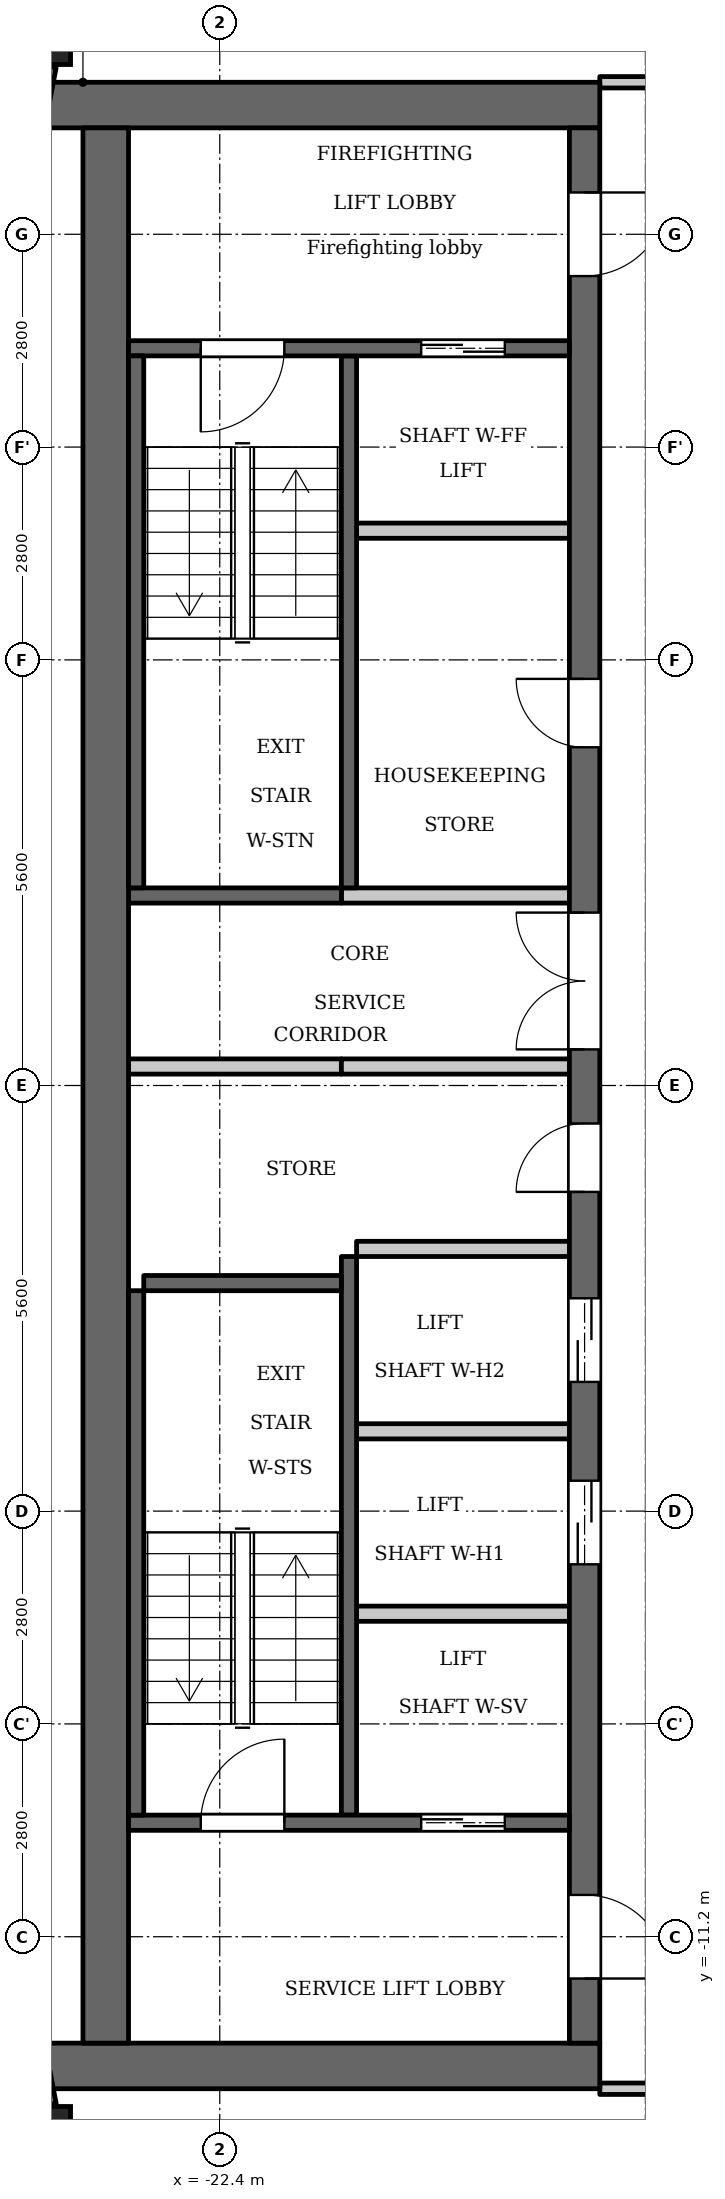
"""IFC4 building model, lengths in metres.
Left out: names, types, materials, properties, quantities, classifications, styles, units other than length and angle.
Written with IfcOpenShell. Run it as: python <this file> out.ifc"""

import sys

from ifc_helpers import new_model, si_unit, direction, frame, frame_2d, origin, origin_2d, place, context, subcontext, project, spatial, rectangle, extrude, element, fill, save


model = new_model("IFC4")
c1 = context("Model", 3, precision=1e-05, world=origin(), true_north=direction((0.0, 1.0)))
c2 = subcontext(c1, "Body", "Model", "MODEL_VIEW")
j1 = project(units=[si_unit("LENGTHUNIT", "METRE"), si_unit("PLANEANGLEUNIT", "RADIAN")], contexts=[c1])
p1 = place(None, origin())
s1 = spatial("IfcSite", under=j1, at=p1, CompositionType="ELEMENT")
p2 = place(p1, origin())
s2 = spatial("IfcBuilding", under=s1, at=p2, CompositionType="ELEMENT")
p3 = place(p2, frame((0.0, 0.0, 269.7)))
s3 = spatial("IfcBuildingStorey", under=s2, at=p3, CompositionType="ELEMENT", Elevation=269.7)
for number, where, z_axis, x_axis in (
    (1, (-24.738, 13.809, 0.0), (0.0, 0.0, 1.0), (1.0, 0.0, 0.0)),
    (2, (-24.738, -13.809, 0.0), (0.0, 0.0, 1.0), (1.0, 0.0, 0.0)),
):
    element("IfcColumn", number, at=place(p3, frame(where, z_axis=z_axis, x_axis=x_axis)), inside=s3, PredefinedType="COLUMN", context=c2, shape_type="SweptSolid", body=[
        extrude(rectangle(XDim=0.75, YDim=0.75, at=origin_2d()), origin(), (0.0, 0.0, 1.0), 3.5),
    ])
for number, where, z_axis, x_axis in (
    (3, (-24.7, 13.42, 0.0), (0.0, 0.0, 1.0), (-0.187, -0.982, 0.0)),
    (4, (-25.053, -11.572, 0.0), (0.0, 0.0, 1.0), (0.187, -0.982, 0.0)),
):
    element("IfcWall", number, at=place(p3, frame(where, z_axis=z_axis, x_axis=x_axis)), inside=s3, PredefinedType="SOLIDWALL", context=c2, shape_type="SweptSolid", body=[
        extrude(rectangle(XDim=1.881, YDim=0.3, at=frame_2d((0.941, 0.0))), origin(), (0.0, 0.0, 1.0), 2.55),
    ])
p4 = place(p3, frame((-20.7, 2.6, 0.0), z_axis=(0.0, 0.0, 1.0), x_axis=(0.0, 1.0, 0.0)))
e5 = element("IfcWall", 5, at=p4, inside=s3, PredefinedType="SHEAR", context=c2, shape_type="SweptSolid", body=[
    extrude(rectangle(XDim=7.0, YDim=0.2, at=frame_2d((3.5, 0.0))), origin(), (0.0, 0.0, 1.0), 3.2),
])
p5 = place(p3, frame((-20.7, -9.6, 0.0), z_axis=(0.0, 0.0, 1.0), x_axis=(0.0, 1.0, 0.0)))
e6 = element("IfcWall", 6, at=p5, inside=s3, PredefinedType="SHEAR", context=c2, shape_type="SweptSolid", body=[
    extrude(rectangle(XDim=7.35, YDim=0.2, at=frame_2d((3.675, 0.0))), origin(), (0.0, 0.0, 1.0), 3.2),
])
p6 = place(p3, frame((-20.8, 2.5, 0.0), z_axis=(0.0, 0.0, 1.0), x_axis=(-1.0, 0.0, 0.0)))
e7 = element("IfcWall", 7, at=p6, inside=s3, PredefinedType="SHEAR", context=c2, shape_type="SweptSolid", body=[
    extrude(rectangle(XDim=2.8, YDim=0.2, at=frame_2d((1.4, 0.0))), origin(), (0.0, 0.0, 1.0), 3.2),
])
p7 = place(p3, frame((-20.8, 0.25, 0.0), z_axis=(0.0, 0.0, 1.0), x_axis=(-1.0, 0.0, 0.0)))
e8 = element("IfcWall", 8, at=p7, inside=s3, PredefinedType="PARTITIONING", context=c2, shape_type="SweptSolid", body=[
    extrude(rectangle(XDim=2.8, YDim=0.2, at=frame_2d((1.4, 0.0))), origin(), (0.0, 0.0, 1.0), 3.2),
])
for number, where, z_axis, x_axis in (
    (9, (-17.4, 12.9, 0.0), (0.0, 0.0, 1.0), (-1.0, 0.0, 0.0)),
    (10, (-17.4, -12.9, 0.0), (0.0, 0.0, 1.0), (-1.0, 0.0, 0.0)),
):
    element("IfcWall", number, at=place(p3, frame(where, z_axis=z_axis, x_axis=x_axis)), inside=s3, PredefinedType="SHEAR", context=c2, shape_type="SweptSolid", body=[
        extrude(rectangle(XDim=7.32, YDim=0.6, at=frame_2d((3.66, 0.0))), origin(), (0.0, 0.0, 1.0), 3.2),
    ])
p8 = place(p3, frame((-17.6, -12.6, 0.0), z_axis=(0.0, 0.0, 1.0), x_axis=(0.0, 1.0, 0.0)))
e11 = element("IfcWall", 11, at=p8, inside=s3, PredefinedType="SHEAR", context=c2, shape_type="SweptSolid", body=[
    extrude(rectangle(XDim=25.2, YDim=0.4, at=frame_2d((12.6, 0.0))), origin(), (0.0, 0.0, 1.0), 3.2),
])
p9 = place(p8, frame((6.3, 0.0, 0.0)))
e12 = element("IfcOpeningElement", 12, at=p9, cuts=e11, PredefinedType="OPENING", context=c2, shape_type="SweptSolid", body=[
    extrude(rectangle(XDim=1.1, YDim=2.1, at=frame_2d((0.55, 1.05))), frame((0.0, 0.21, 0.0), z_axis=(0.0, -1.0, 0.0), x_axis=(1.0, 0.0, 0.0)), (0.0, 0.0, 1.0), 0.42),
])
p10 = place(p8, frame((8.7, 0.0, 0.0)))
e13 = element("IfcOpeningElement", 13, at=p10, cuts=e11, PredefinedType="OPENING", context=c2, shape_type="SweptSolid", body=[
    extrude(rectangle(XDim=1.1, YDim=2.1, at=frame_2d((0.55, 1.05))), frame((0.0, 0.21, 0.0), z_axis=(0.0, -1.0, 0.0), x_axis=(1.0, 0.0, 0.0)), (0.0, 0.0, 1.0), 0.42),
])
p11 = place(p8, frame((11.2, 0.0, 0.0)))
e14 = element("IfcOpeningElement", 14, at=p11, cuts=e11, PredefinedType="OPENING", context=c2, shape_type="SweptSolid", body=[
    extrude(rectangle(XDim=0.9, YDim=2.1, at=frame_2d((0.45, 1.05))), frame((0.0, 0.21, 0.0), z_axis=(0.0, -1.0, 0.0), x_axis=(1.0, 0.0, 0.0)), (0.0, 0.0, 1.0), 0.42),
])
p12 = place(p8, frame((17.05, 0.0, 0.0)))
e15 = element("IfcOpeningElement", 15, at=p12, cuts=e11, PredefinedType="OPENING", context=c2, shape_type="SweptSolid", body=[
    extrude(rectangle(XDim=0.9, YDim=2.1, at=frame_2d((0.45, 1.05))), frame((0.0, 0.21, 0.0), z_axis=(0.0, -1.0, 0.0), x_axis=(1.0, 0.0, 0.0)), (0.0, 0.0, 1.0), 0.42),
])
p13 = place(p8, frame((23.25, 0.0, 0.0)))
e16 = element("IfcOpeningElement", 16, at=p13, cuts=e11, PredefinedType="OPENING", context=c2, shape_type="SweptSolid", body=[
    extrude(rectangle(XDim=1.1, YDim=2.1, at=frame_2d((0.55, 1.05))), frame((0.0, 0.21, 0.0), z_axis=(0.0, -1.0, 0.0), x_axis=(1.0, 0.0, 0.0)), (0.0, 0.0, 1.0), 0.42),
])
p14 = place(p8, frame((0.85, 0.0, 0.0)))
e17 = element("IfcOpeningElement", 17, at=p14, cuts=e11, PredefinedType="OPENING", context=c2, shape_type="SweptSolid", body=[
    extrude(rectangle(XDim=1.1, YDim=2.1, at=frame_2d((0.55, 1.05))), frame((0.0, 0.21, 0.0), z_axis=(0.0, -1.0, 0.0), x_axis=(1.0, 0.0, 0.0)), (0.0, 0.0, 1.0), 0.42),
])
p15 = place(p8, frame((13.075, 0.0, 0.0)))
e18 = element("IfcOpeningElement", 18, at=p15, cuts=e11, PredefinedType="OPENING", context=c2, shape_type="SweptSolid", body=[
    extrude(rectangle(XDim=1.8, YDim=2.1, at=frame_2d((0.9, 1.05))), frame((0.0, 0.21, 0.0), z_axis=(0.0, -1.0, 0.0), x_axis=(1.0, 0.0, 0.0)), (0.0, 0.0, 1.0), 0.42),
])
p16 = place(p3, frame((-23.9, -12.6, 0.0), z_axis=(0.0, 0.0, 1.0), x_axis=(0.0, 1.0, 0.0)))
e19 = element("IfcWall", 19, at=p16, inside=s3, PredefinedType="SHEAR", context=c2, shape_type="SweptSolid", body=[
    extrude(rectangle(XDim=25.2, YDim=0.6, at=frame_2d((12.6, 0.0))), origin(), (0.0, 0.0, 1.0), 3.2),
])
p17 = place(p3, frame((-17.8, -9.7, 0.0), z_axis=(0.0, 0.0, 1.0), x_axis=(-1.0, 0.0, 0.0)))
e20 = element("IfcWall", 20, at=p17, inside=s3, PredefinedType="SHEAR", context=c2, shape_type="SweptSolid", body=[
    extrude(rectangle(XDim=5.8, YDim=0.2, at=frame_2d((2.9, 0.0))), origin(), (0.0, 0.0, 1.0), 3.2),
])
p18 = place(p17, frame((0.85, 0.0, 0.0)))
e21 = element("IfcOpeningElement", 21, at=p18, cuts=e20, PredefinedType="OPENING", context=c2, shape_type="SweptSolid", body=[
    extrude(rectangle(XDim=1.1, YDim=2.1, at=frame_2d((0.55, 1.05))), frame((0.0, 0.11, 0.0), z_axis=(0.0, -1.0, 0.0), x_axis=(1.0, 0.0, 0.0)), (0.0, 0.0, 1.0), 0.22),
])
p19 = place(p17, frame((3.75, 0.0, 0.0)))
e22 = element("IfcOpeningElement", 22, at=p19, cuts=e20, PredefinedType="OPENING", context=c2, shape_type="SweptSolid", body=[
    extrude(rectangle(XDim=1.1, YDim=2.1, at=frame_2d((0.55, 1.05))), frame((0.0, 0.11, 0.0), z_axis=(0.0, -1.0, 0.0), x_axis=(1.0, 0.0, 0.0)), (0.0, 0.0, 1.0), 0.22),
])
for number, where, z_axis, x_axis in (
    (23, (-17.8, -6.95, 0.0), (0.0, 0.0, 1.0), (-1.0, 0.0, 0.0)),
    (24, (-17.8, -4.55, 0.0), (0.0, 0.0, 1.0), (-1.0, 0.0, 0.0)),
    (25, (-17.8, -2.15, 0.0), (0.0, 0.0, 1.0), (-1.0, 0.0, 0.0)),
):
    element("IfcWall", number, at=place(p3, frame(where, z_axis=z_axis, x_axis=x_axis)), inside=s3, PredefinedType="PARTITIONING", context=c2, shape_type="SweptSolid", body=[
        extrude(rectangle(XDim=2.8, YDim=0.2, at=frame_2d((1.4, 0.0))), origin(), (0.0, 0.0, 1.0), 3.2),
    ])
for number, where, z_axis, x_axis in (
    (26, (-17.8, 0.25, 0.0), (0.0, 0.0, 1.0), (-1.0, 0.0, 0.0)),
    (27, (-17.8, 2.5, 0.0), (0.0, 0.0, 1.0), (-1.0, 0.0, 0.0)),
):
    element("IfcWall", number, at=place(p3, frame(where, z_axis=z_axis, x_axis=x_axis)), inside=s3, PredefinedType="PARTITIONING", context=c2, shape_type="SweptSolid", body=[
        extrude(rectangle(XDim=3.0, YDim=0.2, at=frame_2d((1.5, 0.0))), origin(), (0.0, 0.0, 1.0), 3.2),
    ])
p20 = place(p3, frame((-17.8, 7.3, 0.0), z_axis=(0.0, 0.0, 1.0), x_axis=(-1.0, 0.0, 0.0)))
e28 = element("IfcWall", 28, at=p20, inside=s3, PredefinedType="PARTITIONING", context=c2, shape_type="SweptSolid", body=[
    extrude(rectangle(XDim=2.8, YDim=0.2, at=frame_2d((1.4, 0.0))), origin(), (0.0, 0.0, 1.0), 3.2),
])
p21 = place(p3, frame((-17.8, 9.7, 0.0), z_axis=(0.0, 0.0, 1.0), x_axis=(-1.0, 0.0, 0.0)))
e29 = element("IfcWall", 29, at=p21, inside=s3, PredefinedType="SHEAR", context=c2, shape_type="SweptSolid", body=[
    extrude(rectangle(XDim=5.8, YDim=0.2, at=frame_2d((2.9, 0.0))), origin(), (0.0, 0.0, 1.0), 3.2),
])
p22 = place(p21, frame((0.85, 0.0, 0.0)))
e30 = element("IfcOpeningElement", 30, at=p22, cuts=e29, PredefinedType="OPENING", context=c2, shape_type="SweptSolid", body=[
    extrude(rectangle(XDim=1.1, YDim=2.1, at=frame_2d((0.55, 1.05))), frame((0.0, 0.11, 0.0), z_axis=(0.0, -1.0, 0.0), x_axis=(1.0, 0.0, 0.0)), (0.0, 0.0, 1.0), 0.22),
])
p23 = place(p21, frame((3.75, 0.0, 0.0)))
e31 = element("IfcOpeningElement", 31, at=p23, cuts=e29, PredefinedType="OPENING", context=c2, shape_type="SweptSolid", body=[
    extrude(rectangle(XDim=1.1, YDim=2.1, at=frame_2d((0.55, 1.05))), frame((0.0, 0.11, 0.0), z_axis=(0.0, -1.0, 0.0), x_axis=(1.0, 0.0, 0.0)), (0.0, 0.0, 1.0), 0.22),
])
p24 = place(p3, frame((-23.5, 2.6, 0.0), z_axis=(0.0, 0.0, 1.0), x_axis=(0.0, 1.0, 0.0)))
e32 = element("IfcWall", 32, at=p24, inside=s3, PredefinedType="SHEAR", context=c2, shape_type="SweptSolid", body=[
    extrude(rectangle(XDim=7.0, YDim=0.2, at=frame_2d((3.5, 0.0))), origin(), (0.0, 0.0, 1.0), 3.2),
])
p25 = place(p3, frame((-23.5, -9.6, 0.0), z_axis=(0.0, 0.0, 1.0), x_axis=(0.0, 1.0, 0.0)))
e33 = element("IfcWall", 33, at=p25, inside=s3, PredefinedType="SHEAR", context=c2, shape_type="SweptSolid", body=[
    extrude(rectangle(XDim=6.9, YDim=0.2, at=frame_2d((3.45, 0.0))), origin(), (0.0, 0.0, 1.0), 3.2),
])
p26 = place(p3, frame((-20.8, -2.6, 0.0), z_axis=(0.0, 0.0, 1.0), x_axis=(-1.0, 0.0, 0.0)))
e34 = element("IfcWall", 34, at=p26, inside=s3, PredefinedType="SHEAR", context=c2, shape_type="SweptSolid", body=[
    extrude(rectangle(XDim=2.6, YDim=0.2, at=frame_2d((1.3, 0.0))), origin(), (0.0, 0.0, 1.0), 3.2),
])
p27 = place(p3, frame((-17.4, -13.2, 0.0), z_axis=(0.0, 0.0, 1.0), x_axis=(1.0, 0.0, 0.0)))
e35 = element("IfcWall", 35, at=p27, inside=s3, PredefinedType="PARTITIONING", context=c2, shape_type="SweptSolid", body=[
    extrude(rectangle(XDim=2.325, YDim=0.15, at=frame_2d((1.163, 0.0))), origin(), (0.0, 0.0, 1.0), 3.2),
])
p28 = place(p27, frame((0.65, 0.0, 0.0)))
e36 = element("IfcOpeningElement", 36, at=p28, cuts=e35, PredefinedType="OPENING", context=c2, shape_type="SweptSolid", body=[
    extrude(rectangle(XDim=1.0, YDim=2.1, at=frame_2d((0.5, 1.05))), frame((0.0, 0.085, 0.0), z_axis=(0.0, -1.0, 0.0), x_axis=(1.0, 0.0, 0.0)), (0.0, 0.0, 1.0), 0.17),
])
p29 = place(p3, frame((-17.4, 13.2, 0.0), z_axis=(0.0, 0.0, 1.0), x_axis=(1.0, 0.0, 0.0)))
e37 = element("IfcWall", 37, at=p29, inside=s3, PredefinedType="PARTITIONING", context=c2, shape_type="SweptSolid", body=[
    extrude(rectangle(XDim=2.325, YDim=0.15, at=frame_2d((1.163, 0.0))), origin(), (0.0, 0.0, 1.0), 3.2),
])
p30 = place(p29, frame((0.75, 0.0, 0.0)))
e38 = element("IfcOpeningElement", 38, at=p30, cuts=e37, PredefinedType="OPENING", context=c2, shape_type="SweptSolid", body=[
    extrude(rectangle(XDim=1.0, YDim=2.1, at=frame_2d((0.5, 1.05))), frame((0.0, 0.085, 0.0), z_axis=(0.0, -1.0, 0.0), x_axis=(1.0, 0.0, 0.0)), (0.0, 0.0, 1.0), 0.17),
])
p31 = place(p18, origin())
e39 = element("IfcDoor", 39, at=p31, inside=s3, OperationType="DOUBLE_DOOR_SLIDING", PredefinedType="DOOR", context=c2, shape_type="SweptSolid", body=[
    extrude(rectangle(XDim=1.1, YDim=2.1, at=frame_2d((0.55, 1.05))), frame((0.0, 0.025, 0.0), z_axis=(0.0, -1.0, 0.0), x_axis=(1.0, 0.0, 0.0)), (0.0, 0.0, 1.0), 0.05),
])
fill(e21, e39)
p32 = place(p9, origin())
e40 = element("IfcDoor", 40, at=p32, inside=s3, OperationType="DOUBLE_DOOR_SLIDING", PredefinedType="DOOR", context=c2, shape_type="SweptSolid", body=[
    extrude(rectangle(XDim=1.1, YDim=2.1, at=frame_2d((0.55, 1.05))), frame((0.0, 0.025, 0.0), z_axis=(0.0, -1.0, 0.0), x_axis=(1.0, 0.0, 0.0)), (0.0, 0.0, 1.0), 0.05),
])
fill(e12, e40)
p33 = place(p10, origin())
e41 = element("IfcDoor", 41, at=p33, inside=s3, OperationType="DOUBLE_DOOR_SLIDING", PredefinedType="DOOR", context=c2, shape_type="SweptSolid", body=[
    extrude(rectangle(XDim=1.1, YDim=2.1, at=frame_2d((0.55, 1.05))), frame((0.0, 0.025, 0.0), z_axis=(0.0, -1.0, 0.0), x_axis=(1.0, 0.0, 0.0)), (0.0, 0.0, 1.0), 0.05),
])
fill(e13, e41)
p34 = place(p11, origin())
e42 = element("IfcDoor", 42, at=p34, inside=s3, OperationType="SINGLE_SWING_RIGHT", PredefinedType="DOOR", context=c2, shape_type="SweptSolid", body=[
    extrude(rectangle(XDim=0.9, YDim=2.1, at=frame_2d((0.45, 1.05))), frame((0.0, 0.025, 0.0), z_axis=(0.0, -1.0, 0.0), x_axis=(1.0, 0.0, 0.0)), (0.0, 0.0, 1.0), 0.05),
])
fill(e14, e42)
p35 = place(p12, origin())
e43 = element("IfcDoor", 43, at=p35, inside=s3, OperationType="SINGLE_SWING_LEFT", PredefinedType="DOOR", context=c2, shape_type="SweptSolid", body=[
    extrude(rectangle(XDim=0.9, YDim=2.1, at=frame_2d((0.45, 1.05))), frame((0.0, 0.025, 0.0), z_axis=(0.0, -1.0, 0.0), x_axis=(1.0, 0.0, 0.0)), (0.0, 0.0, 1.0), 0.05),
])
fill(e15, e43)
p36 = place(p22, origin())
e44 = element("IfcDoor", 44, at=p36, inside=s3, OperationType="DOUBLE_DOOR_SLIDING", PredefinedType="DOOR", context=c2, shape_type="SweptSolid", body=[
    extrude(rectangle(XDim=1.1, YDim=2.1, at=frame_2d((0.55, 1.05))), frame((0.0, 0.025, 0.0), z_axis=(0.0, -1.0, 0.0), x_axis=(1.0, 0.0, 0.0)), (0.0, 0.0, 1.0), 0.05),
])
fill(e30, e44)
p37 = place(p13, origin())
e45 = element("IfcDoor", 45, at=p37, inside=s3, OperationType="SINGLE_SWING_RIGHT", PredefinedType="DOOR", context=c2, shape_type="SweptSolid", body=[
    extrude(rectangle(XDim=1.1, YDim=2.1, at=frame_2d((0.55, 1.05))), frame((0.0, 0.025, 0.0), z_axis=(0.0, -1.0, 0.0), x_axis=(1.0, 0.0, 0.0)), (0.0, 0.0, 1.0), 0.05),
])
fill(e16, e45)
p38 = place(p14, origin())
e46 = element("IfcDoor", 46, at=p38, inside=s3, OperationType="SINGLE_SWING_LEFT", PredefinedType="DOOR", context=c2, shape_type="SweptSolid", body=[
    extrude(rectangle(XDim=1.1, YDim=2.1, at=frame_2d((0.55, 1.05))), frame((0.0, 0.025, 0.0), z_axis=(0.0, -1.0, 0.0), x_axis=(1.0, 0.0, 0.0)), (0.0, 0.0, 1.0), 0.05),
])
fill(e17, e46)
p39 = place(p23, origin())
e47 = element("IfcDoor", 47, at=p39, inside=s3, OperationType="SINGLE_SWING_LEFT", PredefinedType="DOOR", context=c2, shape_type="SweptSolid", body=[
    extrude(rectangle(XDim=1.1, YDim=2.1, at=frame_2d((0.55, 1.05))), frame((0.0, 0.025, 0.0), z_axis=(0.0, -1.0, 0.0), x_axis=(1.0, 0.0, 0.0)), (0.0, 0.0, 1.0), 0.05),
])
fill(e31, e47)
p40 = place(p19, origin())
e48 = element("IfcDoor", 48, at=p40, inside=s3, OperationType="SINGLE_SWING_LEFT", PredefinedType="DOOR", context=c2, shape_type="SweptSolid", body=[
    extrude(rectangle(XDim=1.1, YDim=2.1, at=frame_2d((0.55, 1.05))), frame((0.0, 0.025, 0.0), z_axis=(0.0, -1.0, 0.0), x_axis=(1.0, 0.0, 0.0)), (0.0, 0.0, 1.0), 0.05),
])
fill(e22, e48)
p41 = place(p15, origin())
e49 = element("IfcDoor", 49, at=p41, inside=s3, OperationType="DOUBLE_DOOR_SINGLE_SWING", PredefinedType="DOOR", context=c2, shape_type="SweptSolid", body=[
    extrude(rectangle(XDim=1.8, YDim=2.1, at=frame_2d((0.9, 1.05))), frame((0.0, 0.025, 0.0), z_axis=(0.0, -1.0, 0.0), x_axis=(1.0, 0.0, 0.0)), (0.0, 0.0, 1.0), 0.05),
])
fill(e18, e49)
save(model, sys.argv[1])
